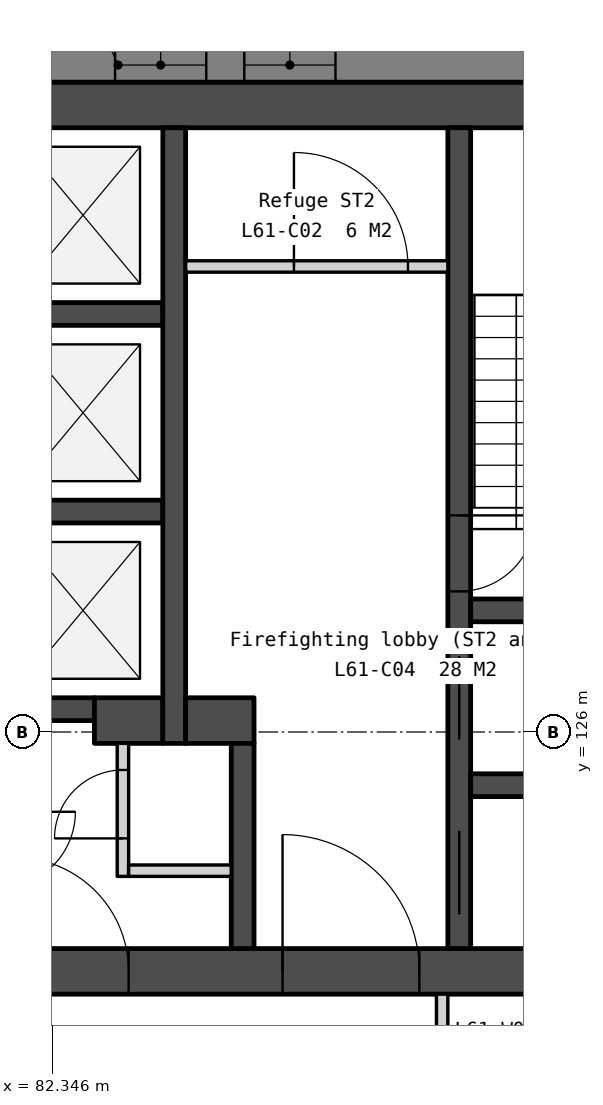
"""IFC4 building model, lengths in metres.
Left out: names, types, materials, properties, quantities, classifications, styles, units other than length and angle.
Written with IfcOpenShell. Run it as: python <this file> out.ifc"""

import sys

from ifc_helpers import new_model, si_unit, direction, frame, frame_2d, origin, place, context, subcontext, project, spatial, polyline, rectangle, outline, extrude, element, fill, save


model = new_model("IFC4")
c1 = context("Model", 3, precision=1e-05, world=origin(), true_north=direction((0.0, 1.0)))
c2 = subcontext(c1, "Body", "Model", "MODEL_VIEW")
j1 = project(units=[si_unit("LENGTHUNIT", "METRE"), si_unit("PLANEANGLEUNIT", "RADIAN")], contexts=[c1])
p1 = place(None, origin())
s1 = spatial("IfcSite", under=j1, at=p1, CompositionType="ELEMENT")
p2 = place(p1, origin())
s2 = spatial("IfcBuilding", under=s1, at=p2, CompositionType="ELEMENT")
p3 = place(p2, frame((0.0, 0.0, 250.4)))
s3 = spatial("IfcBuildingStorey", under=s2, at=p3, CompositionType="ELEMENT", Elevation=250.4)
p4 = place(p3, frame((69.0, 134.25, 0.0), z_axis=(0.0, 0.0, 1.0), x_axis=(1.0, 0.0, 0.0)))
e1 = element("IfcWall", 1, at=p4, inside=s3, PredefinedType="SOLIDWALL", context=c2, shape_type="SweptSolid", body=[
    extrude(rectangle(XDim=22.0, YDim=0.6, at=frame_2d((11.0, 0.0))), origin(), (0.0, 0.0, 1.0), 3.75),
])
p5 = place(p3, frame((69.0, 122.85, 0.0), z_axis=(0.0, 0.0, 1.0), x_axis=(1.0, 0.0, 0.0)))
e2 = element("IfcWall", 2, at=p5, inside=s3, PredefinedType="SOLIDWALL", context=c2, shape_type="SweptSolid", body=[
    extrude(rectangle(XDim=22.0, YDim=0.6, at=frame_2d((11.0, 0.0))), origin(), (0.0, 0.0, 1.0), 3.75),
])
p6 = place(p5, frame((16.375, 0.0, 0.0)))
e3 = element("IfcOpeningElement", 3, at=p6, cuts=e2, PredefinedType="OPENING", context=c2, shape_type="SweptSolid", body=[
    extrude(rectangle(XDim=1.8, YDim=2.1, at=frame_2d((0.9, 1.05))), frame((0.0, 0.31, 0.0), z_axis=(0.0, -1.0, 0.0), x_axis=(1.0, 0.0, 0.0)), (0.0, 0.0, 1.0), 0.62),
])
p7 = place(p5, frame((3.825, 0.0, 0.0)))
e4 = element("IfcOpeningElement", 4, at=p7, cuts=e2, PredefinedType="OPENING", context=c2, shape_type="SweptSolid", body=[
    extrude(rectangle(XDim=1.8, YDim=2.1, at=frame_2d((0.9, 1.05))), frame((0.0, 0.31, 0.0), z_axis=(0.0, -1.0, 0.0), x_axis=(1.0, 0.0, 0.0)), (0.0, 0.0, 1.0), 0.62),
])
p8 = place(p5, frame((12.85, 0.0, 0.0)))
e5 = element("IfcOpeningElement", 5, at=p8, cuts=e2, PredefinedType="OPENING", context=c2, shape_type="SweptSolid", body=[
    extrude(rectangle(XDim=1.5, YDim=2.1, at=frame_2d((0.75, 1.05))), frame((0.0, 0.31, 0.0), z_axis=(0.0, -1.0, 0.0), x_axis=(1.0, 0.0, 0.0)), (0.0, 0.0, 1.0), 0.62),
])
for number, where, z_axis, x_axis in (
    (6, (81.7, 131.5, 0.0), (0.0, 0.0, 1.0), (1.0, 0.0, 0.0)),
    (7, (81.7, 128.9, 0.0), (0.0, 0.0, 1.0), (1.0, 0.0, 0.0)),
):
    element("IfcWall", number, at=place(p3, frame(where, z_axis=z_axis, x_axis=x_axis)), inside=s3, PredefinedType="SOLIDWALL", context=c2, shape_type="SweptSolid", body=[
        extrude(rectangle(XDim=2.1, YDim=0.3, at=frame_2d((1.05, 0.0))), origin(), (0.0, 0.0, 1.0), 3.75),
    ])
p9 = place(p3, frame((81.7, 126.3, 0.0), z_axis=(0.0, 0.0, 1.0), x_axis=(1.0, 0.0, 0.0)))
e8 = element("IfcWall", 8, at=p9, inside=s3, PredefinedType="SOLIDWALL", context=c2, shape_type="SweptSolid", body=[
    extrude(rectangle(XDim=1.2, YDim=0.3, at=frame_2d((0.6, 0.0))), origin(), (0.0, 0.0, 1.0), 3.75),
])
p10 = place(p3, frame((82.9, 126.15, 0.0), z_axis=(0.0, 0.0, 1.0), x_axis=(1.0, 0.0, 0.0)))
e9 = element("IfcWall", 9, at=p10, inside=s3, PredefinedType="SOLIDWALL", context=c2, shape_type="SweptSolid", body=[
    extrude(rectangle(XDim=0.9, YDim=0.6, at=frame_2d((0.45, 0.0))), origin(), (0.0, 0.0, 1.0), 3.75),
])
p11 = place(p3, frame((83.275, 125.85, 0.0), z_axis=(0.0, 0.0, 1.0), x_axis=(0.0, -1.0, 0.0)))
e10 = element("IfcWall", 10, at=p11, inside=s3, PredefinedType="PARTITIONING", context=c2, shape_type="SweptSolid", body=[
    extrude(rectangle(XDim=1.75, YDim=0.15, at=frame_2d((0.875, 0.0))), origin(), (0.0, 0.0, 1.0), 3.75),
])
p12 = place(p11, frame((0.35, 0.0, 0.0)))
e11 = element("IfcOpeningElement", 11, at=p12, cuts=e10, PredefinedType="OPENING", context=c2, shape_type="SweptSolid", body=[
    extrude(rectangle(XDim=0.9, YDim=2.1, at=frame_2d((0.45, 1.05))), frame((0.0, 0.085, 0.0), z_axis=(0.0, -1.0, 0.0), x_axis=(1.0, 0.0, 0.0)), (0.0, 0.0, 1.0), 0.17),
])
p13 = place(p3, frame((83.35, 124.175, 0.0), z_axis=(0.0, 0.0, 1.0), x_axis=(1.0, 0.0, 0.0)))
e12 = element("IfcWall", 12, at=p13, inside=s3, PredefinedType="PARTITIONING", context=c2, shape_type="SweptSolid", body=[
    extrude(rectangle(XDim=1.35, YDim=0.15, at=frame_2d((0.675, 0.0))), origin(), (0.0, 0.0, 1.0), 3.75),
])
p14 = place(p3, frame((83.95, 133.95, 0.0), z_axis=(0.0, 0.0, 1.0), x_axis=(0.0, -1.0, 0.0)))
e13 = element("IfcWall", 13, at=p14, inside=s3, PredefinedType="SOLIDWALL", context=c2, shape_type="SweptSolid", body=[
    extrude(rectangle(XDim=8.1, YDim=0.3, at=frame_2d((4.05, 0.0))), origin(), (0.0, 0.0, 1.0), 3.75),
])
p15 = place(p3, frame((84.1, 132.125, 0.0), z_axis=(0.0, 0.0, 1.0), x_axis=(1.0, 0.0, 0.0)))
e14 = element("IfcWall", 14, at=p15, inside=s3, PredefinedType="PARTITIONING", context=c2, shape_type="SweptSolid", body=[
    extrude(rectangle(XDim=3.45, YDim=0.15, at=frame_2d((1.725, 0.0))), origin(), (0.0, 0.0, 1.0), 3.75),
])
p16 = place(p15, frame((1.425, 0.0, 0.0)))
e15 = element("IfcOpeningElement", 15, at=p16, cuts=e14, PredefinedType="OPENING", context=c2, shape_type="SweptSolid", body=[
    extrude(rectangle(XDim=1.5, YDim=2.1, at=frame_2d((0.75, 1.05))), frame((0.0, 0.085, 0.0), z_axis=(0.0, -1.0, 0.0), x_axis=(1.0, 0.0, 0.0)), (0.0, 0.0, 1.0), 0.17),
])
p17 = place(p3, frame((84.1, 126.15, 0.0), z_axis=(0.0, 0.0, 1.0), x_axis=(1.0, 0.0, 0.0)))
e16 = element("IfcWall", 16, at=p17, inside=s3, PredefinedType="SOLIDWALL", context=c2, shape_type="SweptSolid", body=[
    extrude(rectangle(XDim=0.9, YDim=0.6, at=frame_2d((0.45, 0.0))), origin(), (0.0, 0.0, 1.0), 3.75),
])
p18 = place(p3, frame((84.85, 125.85, 0.0), z_axis=(0.0, 0.0, 1.0), x_axis=(0.0, -1.0, 0.0)))
e17 = element("IfcWall", 17, at=p18, inside=s3, PredefinedType="SOLIDWALL", context=c2, shape_type="SweptSolid", body=[
    extrude(rectangle(XDim=2.7, YDim=0.3, at=frame_2d((1.35, 0.0))), origin(), (0.0, 0.0, 1.0), 3.75),
])
p19 = place(p3, frame((87.7, 133.95, 0.0), z_axis=(0.0, 0.0, 1.0), x_axis=(0.0, -1.0, 0.0)))
e18 = element("IfcWall", 18, at=p19, inside=s3, PredefinedType="SOLIDWALL", context=c2, shape_type="SweptSolid", body=[
    extrude(rectangle(XDim=10.8, YDim=0.3, at=frame_2d((5.4, 0.0))), origin(), (0.0, 0.0, 1.0), 3.75),
])
p20 = place(p19, frame((6.95, 0.0, 0.0)))
e19 = element("IfcOpeningElement", 19, at=p20, cuts=e18, PredefinedType="OPENING", context=c2, shape_type="SweptSolid", body=[
    extrude(rectangle(XDim=1.1, YDim=2.1, at=frame_2d((0.55, 1.05))), frame((0.0, 0.16, 0.0), z_axis=(0.0, -1.0, 0.0), x_axis=(1.0, 0.0, 0.0)), (0.0, 0.0, 1.0), 0.32),
])
p21 = place(p19, frame((5.1, 0.0, 0.0)))
e20 = element("IfcOpeningElement", 20, at=p21, cuts=e18, PredefinedType="OPENING", context=c2, shape_type="SweptSolid", body=[
    extrude(rectangle(XDim=1.0, YDim=2.1, at=frame_2d((0.5, 1.05))), frame((0.0, 0.16, 0.0), z_axis=(0.0, -1.0, 0.0), x_axis=(1.0, 0.0, 0.0)), (0.0, 0.0, 1.0), 0.32),
])
p22 = place(p19, frame((9.25, 0.0, 0.0)))
e21 = element("IfcOpeningElement", 21, at=p22, cuts=e18, PredefinedType="OPENING", context=c2, shape_type="SweptSolid", body=[
    extrude(rectangle(XDim=1.1, YDim=2.1, at=frame_2d((0.55, 1.05))), frame((0.0, 0.16, 0.0), z_axis=(0.0, -1.0, 0.0), x_axis=(1.0, 0.0, 0.0)), (0.0, 0.0, 1.0), 0.32),
])
for number, where, z_axis, x_axis in (
    (22, (87.85, 127.6, 0.0), (0.0, 0.0, 1.0), (1.0, 0.0, 0.0)),
    (23, (87.85, 125.3, 0.0), (0.0, 0.0, 1.0), (1.0, 0.0, 0.0)),
):
    element("IfcWall", number, at=place(p3, frame(where, z_axis=z_axis, x_axis=x_axis)), inside=s3, PredefinedType="SOLIDWALL", context=c2, shape_type="SweptSolid", body=[
        extrude(rectangle(XDim=2.55, YDim=0.3, at=frame_2d((1.275, 0.0))), origin(), (0.0, 0.0, 1.0), 3.75),
    ])
p23 = place(p3, frame((98.486, 134.775, -0.15), z_axis=(0.0, 0.0, 1.0), x_axis=(-1.0, 0.0, 0.0)))
e24 = element("IfcWall", 24, at=p23, inside=s3, PredefinedType="SOLIDWALL", context=c2, shape_type="SweptSolid", body=[
    extrude(outline(polyline([(0.0, 0.0), (0.0, 3.9), (30.551, 3.9), (30.551, 0.0), (0.0, 0.0)])), frame((0.0, 0.225, 0.0), z_axis=(0.0, -1.0, 0.0), x_axis=(1.0, 0.0, 0.0)), (0.0, 0.0, 1.0), 0.45),
])
p24 = place(p23, frame((3.172, 0.0, 0.95)))
e25 = element("IfcOpeningElement", 25, at=p24, cuts=e24, PredefinedType="OPENING", context=c2, shape_type="SweptSolid", body=[
    extrude(rectangle(XDim=1.2, YDim=2.2, at=frame_2d((0.6, 1.1))), frame((0.0, 0.235, 0.0), z_axis=(0.0, -1.0, 0.0), x_axis=(1.0, 0.0, 0.0)), (0.0, 0.0, 1.0), 0.47),
])
p25 = place(p23, frame((4.872, 0.0, 0.95)))
e26 = element("IfcOpeningElement", 26, at=p25, cuts=e24, PredefinedType="OPENING", context=c2, shape_type="SweptSolid", body=[
    extrude(rectangle(XDim=1.2, YDim=2.2, at=frame_2d((0.6, 1.1))), frame((0.0, 0.235, 0.0), z_axis=(0.0, -1.0, 0.0), x_axis=(1.0, 0.0, 0.0)), (0.0, 0.0, 1.0), 0.47),
])
p26 = place(p23, frame((12.415, 0.0, 0.95)))
e27 = element("IfcOpeningElement", 27, at=p26, cuts=e24, PredefinedType="OPENING", context=c2, shape_type="SweptSolid", body=[
    extrude(rectangle(XDim=1.2, YDim=2.2, at=frame_2d((0.6, 1.1))), frame((0.0, 0.235, 0.0), z_axis=(0.0, -1.0, 0.0), x_axis=(1.0, 0.0, 0.0)), (0.0, 0.0, 1.0), 0.47),
])
p27 = place(p23, frame((14.115, 0.0, 0.95)))
e28 = element("IfcOpeningElement", 28, at=p27, cuts=e24, PredefinedType="OPENING", context=c2, shape_type="SweptSolid", body=[
    extrude(rectangle(XDim=1.2, YDim=2.2, at=frame_2d((0.6, 1.1))), frame((0.0, 0.235, 0.0), z_axis=(0.0, -1.0, 0.0), x_axis=(1.0, 0.0, 0.0)), (0.0, 0.0, 1.0), 0.47),
])
p28 = place(p23, frame((21.658, 0.0, 0.95)))
e29 = element("IfcOpeningElement", 29, at=p28, cuts=e24, PredefinedType="OPENING", context=c2, shape_type="SweptSolid", body=[
    extrude(rectangle(XDim=1.2, YDim=2.2, at=frame_2d((0.6, 1.1))), frame((0.0, 0.235, 0.0), z_axis=(0.0, -1.0, 0.0), x_axis=(1.0, 0.0, 0.0)), (0.0, 0.0, 1.0), 0.47),
])
p29 = place(p23, frame((23.358, 0.0, 0.95)))
e30 = element("IfcOpeningElement", 30, at=p29, cuts=e24, PredefinedType="OPENING", context=c2, shape_type="SweptSolid", body=[
    extrude(rectangle(XDim=1.2, YDim=2.2, at=frame_2d((0.6, 1.1))), frame((0.0, 0.235, 0.0), z_axis=(0.0, -1.0, 0.0), x_axis=(1.0, 0.0, 0.0)), (0.0, 0.0, 1.0), 0.47),
])
p30 = place(p3, frame((80.905, 101.188, -0.15), z_axis=(0.0, 0.0, 1.0), x_axis=(0.500002536638, 0.866023939251, 0.0)))
e31 = element("IfcWall", 31, at=p30, inside=s3, PredefinedType="SOLIDWALL", context=c2, shape_type="SweptSolid", body=[
    extrude(outline(polyline([(36.972, 0.0), (36.972, 3.9), (0.0, 3.9), (0.0, 0.0), (36.972, 0.0)])), frame((0.0, 0.225, 0.0), z_axis=(0.0, -1.0, 0.0), x_axis=(1.0, 0.0, 0.0)), (0.0, 0.0, 1.0), 0.45),
])
p31 = place(p30, frame((3.172, 0.0, 0.95)))
e32 = element("IfcOpeningElement", 32, at=p31, cuts=e31, PredefinedType="OPENING", context=c2, shape_type="SweptSolid", body=[
    extrude(rectangle(XDim=1.2, YDim=2.2, at=frame_2d((0.6, 1.1))), frame((0.0, 0.235, 0.0), z_axis=(0.0, -1.0, 0.0), x_axis=(1.0, 0.0, 0.0)), (0.0, 0.0, 1.0), 0.47),
])
p32 = place(p30, frame((4.872, 0.0, 0.95)))
e33 = element("IfcOpeningElement", 33, at=p32, cuts=e31, PredefinedType="OPENING", context=c2, shape_type="SweptSolid", body=[
    extrude(rectangle(XDim=1.2, YDim=2.2, at=frame_2d((0.6, 1.1))), frame((0.0, 0.235, 0.0), z_axis=(0.0, -1.0, 0.0), x_axis=(1.0, 0.0, 0.0)), (0.0, 0.0, 1.0), 0.47),
])
p33 = place(p30, frame((12.415, 0.0, 0.95)))
e34 = element("IfcOpeningElement", 34, at=p33, cuts=e31, PredefinedType="OPENING", context=c2, shape_type="SweptSolid", body=[
    extrude(rectangle(XDim=1.2, YDim=2.2, at=frame_2d((0.6, 1.1))), frame((0.0, 0.235, 0.0), z_axis=(0.0, -1.0, 0.0), x_axis=(1.0, 0.0, 0.0)), (0.0, 0.0, 1.0), 0.47),
])
p34 = place(p30, frame((14.115, 0.0, 0.95)))
e35 = element("IfcOpeningElement", 35, at=p34, cuts=e31, PredefinedType="OPENING", context=c2, shape_type="SweptSolid", body=[
    extrude(rectangle(XDim=1.2, YDim=2.2, at=frame_2d((0.6, 1.1))), frame((0.0, 0.235, 0.0), z_axis=(0.0, -1.0, 0.0), x_axis=(1.0, 0.0, 0.0)), (0.0, 0.0, 1.0), 0.47),
])
p35 = place(p30, frame((21.658, 0.0, 0.95)))
e36 = element("IfcOpeningElement", 36, at=p35, cuts=e31, PredefinedType="OPENING", context=c2, shape_type="SweptSolid", body=[
    extrude(rectangle(XDim=1.2, YDim=2.2, at=frame_2d((0.6, 1.1))), frame((0.0, 0.235, 0.0), z_axis=(0.0, -1.0, 0.0), x_axis=(1.0, 0.0, 0.0)), (0.0, 0.0, 1.0), 0.47),
])
p36 = place(p30, frame((23.358, 0.0, 0.95)))
e37 = element("IfcOpeningElement", 37, at=p36, cuts=e31, PredefinedType="OPENING", context=c2, shape_type="SweptSolid", body=[
    extrude(rectangle(XDim=1.2, YDim=2.2, at=frame_2d((0.6, 1.1))), frame((0.0, 0.235, 0.0), z_axis=(0.0, -1.0, 0.0), x_axis=(1.0, 0.0, 0.0)), (0.0, 0.0, 1.0), 0.47),
])
p37 = place(p30, frame((30.901, 0.0, 0.95)))
e38 = element("IfcOpeningElement", 38, at=p37, cuts=e31, PredefinedType="OPENING", context=c2, shape_type="SweptSolid", body=[
    extrude(rectangle(XDim=1.2, YDim=2.2, at=frame_2d((0.6, 1.1))), frame((0.0, 0.235, 0.0), z_axis=(0.0, -1.0, 0.0), x_axis=(1.0, 0.0, 0.0)), (0.0, 0.0, 1.0), 0.47),
])
p38 = place(p30, frame((32.601, 0.0, 0.95)))
e39 = element("IfcOpeningElement", 39, at=p38, cuts=e31, PredefinedType="OPENING", context=c2, shape_type="SweptSolid", body=[
    extrude(rectangle(XDim=1.2, YDim=2.2, at=frame_2d((0.6, 1.1))), frame((0.0, 0.235, 0.0), z_axis=(0.0, -1.0, 0.0), x_axis=(1.0, 0.0, 0.0)), (0.0, 0.0, 1.0), 0.47),
])
p39 = place(p3, frame((87.475, 120.025, 0.0), z_axis=(0.0, 0.0, 1.0), x_axis=(0.0, 1.0, 0.0)))
e40 = element("IfcWall", 40, at=p39, inside=s3, PredefinedType="PARTITIONING", context=c2, shape_type="SweptSolid", body=[
    extrude(rectangle(XDim=2.525, YDim=0.15, at=frame_2d((1.263, 0.0))), origin(), (0.0, 0.0, 1.0), 3.75),
])
p40 = place(p39, frame((0.762, 0.0, 0.0)))
e41 = element("IfcOpeningElement", 41, at=p40, cuts=e40, PredefinedType="OPENING", context=c2, shape_type="SweptSolid", body=[
    extrude(rectangle(XDim=1.0, YDim=2.1, at=frame_2d((0.5, 1.05))), frame((0.0, 0.085, 0.0), z_axis=(0.0, -1.0, 0.0), x_axis=(1.0, 0.0, 0.0)), (0.0, 0.0, 1.0), 0.17),
])
p41 = place(p20, origin())
e42 = element("IfcDoor", 42, at=p41, inside=s3, OperationType="SLIDING_TO_LEFT", PredefinedType="DOOR", context=c2, shape_type="SweptSolid", body=[
    extrude(rectangle(XDim=1.1, YDim=2.1, at=frame_2d((0.55, 1.05))), frame((0.0, 0.025, 0.0), z_axis=(0.0, -1.0, 0.0), x_axis=(1.0, 0.0, 0.0)), (0.0, 0.0, 1.0), 0.05),
])
fill(e19, e42)
p42 = place(p6, origin())
e43 = element("IfcDoor", 43, at=p42, inside=s3, OperationType="DOUBLE_DOOR_DOUBLE_SWING", PredefinedType="DOOR", context=c2, shape_type="SweptSolid", body=[
    extrude(rectangle(XDim=1.8, YDim=2.1, at=frame_2d((0.9, 1.05))), frame((0.0, 0.025, 0.0), z_axis=(0.0, -1.0, 0.0), x_axis=(1.0, 0.0, 0.0)), (0.0, 0.0, 1.0), 0.05),
])
fill(e3, e43)
p43 = place(p8, origin())
e44 = element("IfcDoor", 44, at=p43, inside=s3, OperationType="DOUBLE_DOOR_DOUBLE_SWING", PredefinedType="DOOR", context=c2, shape_type="SweptSolid", body=[
    extrude(rectangle(XDim=1.5, YDim=2.1, at=frame_2d((0.75, 1.05))), frame((0.0, 0.025, 0.0), z_axis=(0.0, -1.0, 0.0), x_axis=(1.0, 0.0, 0.0)), (0.0, 0.0, 1.0), 0.05),
])
fill(e5, e44)
p44 = place(p12, origin())
e45 = element("IfcDoor", 45, at=p44, inside=s3, OperationType="SINGLE_SWING_RIGHT", PredefinedType="DOOR", context=c2, shape_type="SweptSolid", body=[
    extrude(rectangle(XDim=0.9, YDim=2.1, at=frame_2d((0.45, 1.05))), frame((0.0, 0.025, 0.0), z_axis=(0.0, -1.0, 0.0), x_axis=(1.0, 0.0, 0.0)), (0.0, 0.0, 1.0), 0.05),
])
fill(e11, e45)
p45 = place(p16, origin())
e46 = element("IfcDoor", 46, at=p45, inside=s3, OperationType="DOUBLE_DOOR_DOUBLE_SWING", PredefinedType="DOOR", context=c2, shape_type="SweptSolid", body=[
    extrude(rectangle(XDim=1.5, YDim=2.1, at=frame_2d((0.75, 1.05))), frame((0.0, 0.025, 0.0), z_axis=(0.0, -1.0, 0.0), x_axis=(1.0, 0.0, 0.0)), (0.0, 0.0, 1.0), 0.05),
])
fill(e15, e46)
p46 = place(p21, origin())
e47 = element("IfcDoor", 47, at=p46, inside=s3, OperationType="SINGLE_SWING_LEFT", PredefinedType="DOOR", context=c2, shape_type="SweptSolid", body=[
    extrude(rectangle(XDim=1.0, YDim=2.1, at=frame_2d((0.5, 1.05))), frame((0.0, 0.025, 0.0), z_axis=(0.0, -1.0, 0.0), x_axis=(1.0, 0.0, 0.0)), (0.0, 0.0, 1.0), 0.05),
])
fill(e20, e47)
p47 = place(p22, origin())
e48 = element("IfcDoor", 48, at=p47, inside=s3, OperationType="SLIDING_TO_LEFT", PredefinedType="DOOR", context=c2, shape_type="SweptSolid", body=[
    extrude(rectangle(XDim=1.1, YDim=2.1, at=frame_2d((0.55, 1.05))), frame((0.0, 0.025, 0.0), z_axis=(0.0, -1.0, 0.0), x_axis=(1.0, 0.0, 0.0)), (0.0, 0.0, 1.0), 0.05),
])
fill(e21, e48)
p48 = place(p26, origin())
e49 = element("IfcWindow", 49, at=p48, inside=s3, PartitioningType="SINGLE_PANEL", PredefinedType="WINDOW", context=c2, shape_type="SweptSolid", body=[
    extrude(rectangle(XDim=1.2, YDim=2.2, at=frame_2d((0.6, 1.1))), frame((0.0, 0.03, 0.0), z_axis=(0.0, -1.0, 0.0), x_axis=(1.0, 0.0, 0.0)), (0.0, 0.0, 1.0), 0.06),
])
fill(e27, e49)
p49 = place(p27, origin())
e50 = element("IfcWindow", 50, at=p49, inside=s3, PartitioningType="SINGLE_PANEL", PredefinedType="WINDOW", context=c2, shape_type="SweptSolid", body=[
    extrude(rectangle(XDim=1.2, YDim=2.2, at=frame_2d((0.6, 1.1))), frame((0.0, 0.03, 0.0), z_axis=(0.0, -1.0, 0.0), x_axis=(1.0, 0.0, 0.0)), (0.0, 0.0, 1.0), 0.06),
])
fill(e28, e50)
save(model, sys.argv[1])
